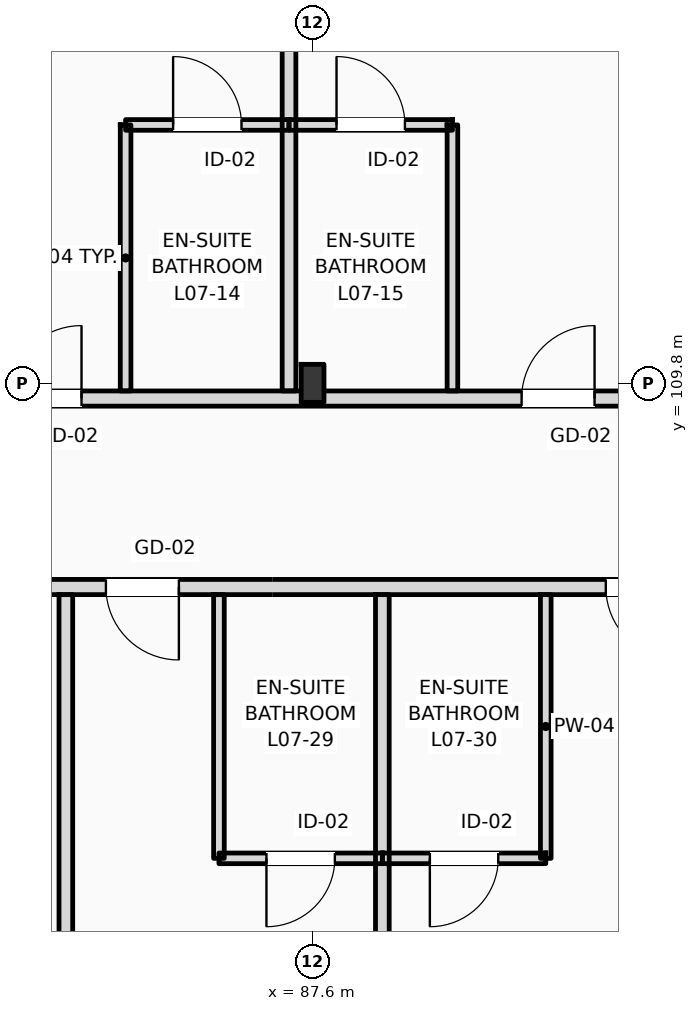
"""IFC4 building model, lengths in metres.
Left out: names, types, materials, properties, quantities, classifications, styles, units other than length and angle.
Written with IfcOpenShell. Run it as: python <this file> out.ifc"""

import sys

from ifc_helpers import new_model, si_unit, direction, frame, frame_2d, origin, origin_2d, place, context, subcontext, project, spatial, rectangle, i_section, extrude, element, fill, save


model = new_model("IFC4")
c1 = context("Model", 3, precision=1e-05, world=origin(), true_north=direction((0.0, 1.0)))
c2 = subcontext(c1, "Body", "Model", "MODEL_VIEW")
j1 = project(units=[si_unit("LENGTHUNIT", "METRE"), si_unit("PLANEANGLEUNIT", "RADIAN")], contexts=[c1])
p1 = place(None, origin())
s1 = spatial("IfcSite", under=j1, at=p1, CompositionType="ELEMENT")
p2 = place(p1, origin())
s2 = spatial("IfcBuilding", under=s1, at=p2, CompositionType="ELEMENT")
p3 = place(p2, frame((0.0, 0.0, 31.8)))
s3 = spatial("IfcBuildingStorey", under=s2, at=p3, CompositionType="ELEMENT", Elevation=31.8)
p4 = place(p3, frame((87.6, 109.8, 0.0), z_axis=(0.0, 0.0, 1.0), x_axis=(1.0, 0.0, 0.0)))
e1 = element("IfcColumn", 1, at=p4, inside=s3, PredefinedType="COLUMN", context=c2, shape_type="SweptSolid", body=[
    extrude(i_section(OverallWidth=0.3, OverallDepth=0.5, WebThickness=0.014, FlangeThickness=0.028, FilletRadius=0.027, at=origin_2d()), origin(), (0.0, 0.0, 1.0), 3.6),
])
p5 = place(p3, frame((10.65, 109.6, 0.0), z_axis=(0.0, 0.0, 1.0), x_axis=(1.0, 0.0, 0.0)))
e2 = element("IfcWall", 2, at=p5, inside=s3, PredefinedType="PARTITIONING", context=c2, shape_type="SweptSolid", body=[
    extrude(rectangle(XDim=109.21, YDim=0.2, at=frame_2d((54.605, 0.0))), origin(), (0.0, 0.0, 1.0), 2.72),
])
p6 = place(p5, frame((15.825, 0.0, 0.0)))
e3 = element("IfcOpeningElement", 3, at=p6, cuts=e2, PredefinedType="OPENING", context=c2, shape_type="SweptSolid", body=[
    extrude(rectangle(XDim=1.02, YDim=2.2, at=frame_2d((0.51, 1.1))), frame((0.0, 0.11, 0.0), z_axis=(0.0, -1.0, 0.0), x_axis=(1.0, 0.0, 0.0)), (0.0, 0.0, 1.0), 0.22),
])
p7 = place(p5, frame((19.87, 0.0, 0.0)))
e4 = element("IfcOpeningElement", 4, at=p7, cuts=e2, PredefinedType="OPENING", context=c2, shape_type="SweptSolid", body=[
    extrude(rectangle(XDim=1.02, YDim=2.2, at=frame_2d((0.51, 1.1))), frame((0.0, 0.11, 0.0), z_axis=(0.0, -1.0, 0.0), x_axis=(1.0, 0.0, 0.0)), (0.0, 0.0, 1.0), 0.22),
])
p8 = place(p5, frame((24.47, 0.0, 0.0)))
e5 = element("IfcOpeningElement", 5, at=p8, cuts=e2, PredefinedType="OPENING", context=c2, shape_type="SweptSolid", body=[
    extrude(rectangle(XDim=1.02, YDim=2.2, at=frame_2d((0.51, 1.1))), frame((0.0, 0.11, 0.0), z_axis=(0.0, -1.0, 0.0), x_axis=(1.0, 0.0, 0.0)), (0.0, 0.0, 1.0), 0.22),
])
p9 = place(p5, frame((26.92, 0.0, 0.0)))
e6 = element("IfcOpeningElement", 6, at=p9, cuts=e2, PredefinedType="OPENING", context=c2, shape_type="SweptSolid", body=[
    extrude(rectangle(XDim=1.02, YDim=2.2, at=frame_2d((0.51, 1.1))), frame((0.0, 0.11, 0.0), z_axis=(0.0, -1.0, 0.0), x_axis=(1.0, 0.0, 0.0)), (0.0, 0.0, 1.0), 0.22),
])
p10 = place(p5, frame((33.7, 0.0, 0.0)))
e7 = element("IfcOpeningElement", 7, at=p10, cuts=e2, PredefinedType="OPENING", context=c2, shape_type="SweptSolid", body=[
    extrude(rectangle(XDim=0.96, YDim=2.2, at=frame_2d((0.48, 1.1))), frame((0.0, 0.11, 0.0), z_axis=(0.0, -1.0, 0.0), x_axis=(1.0, 0.0, 0.0)), (0.0, 0.0, 1.0), 0.22),
])
p11 = place(p5, frame((35.9, 0.0, 0.0)))
e8 = element("IfcOpeningElement", 8, at=p11, cuts=e2, PredefinedType="OPENING", context=c2, shape_type="SweptSolid", body=[
    extrude(rectangle(XDim=0.96, YDim=2.2, at=frame_2d((0.48, 1.1))), frame((0.0, 0.11, 0.0), z_axis=(0.0, -1.0, 0.0), x_axis=(1.0, 0.0, 0.0)), (0.0, 0.0, 1.0), 0.22),
])
p12 = place(p5, frame((42.9, 0.0, 0.0)))
e9 = element("IfcOpeningElement", 9, at=p12, cuts=e2, PredefinedType="OPENING", context=c2, shape_type="SweptSolid", body=[
    extrude(rectangle(XDim=0.96, YDim=2.2, at=frame_2d((0.48, 1.1))), frame((0.0, 0.11, 0.0), z_axis=(0.0, -1.0, 0.0), x_axis=(1.0, 0.0, 0.0)), (0.0, 0.0, 1.0), 0.22),
])
p13 = place(p5, frame((47.5, 0.0, 0.0)))
e10 = element("IfcOpeningElement", 10, at=p13, cuts=e2, PredefinedType="OPENING", context=c2, shape_type="SweptSolid", body=[
    extrude(rectangle(XDim=0.96, YDim=2.2, at=frame_2d((0.48, 1.1))), frame((0.0, 0.11, 0.0), z_axis=(0.0, -1.0, 0.0), x_axis=(1.0, 0.0, 0.0)), (0.0, 0.0, 1.0), 0.22),
])
p14 = place(p5, frame((49.95, 0.0, 0.0)))
e11 = element("IfcOpeningElement", 11, at=p14, cuts=e2, PredefinedType="OPENING", context=c2, shape_type="SweptSolid", body=[
    extrude(rectangle(XDim=0.96, YDim=2.2, at=frame_2d((0.48, 1.1))), frame((0.0, 0.11, 0.0), z_axis=(0.0, -1.0, 0.0), x_axis=(1.0, 0.0, 0.0)), (0.0, 0.0, 1.0), 0.22),
])
p15 = place(p5, frame((56.7, 0.0, 0.0)))
e12 = element("IfcOpeningElement", 12, at=p15, cuts=e2, PredefinedType="OPENING", context=c2, shape_type="SweptSolid", body=[
    extrude(rectangle(XDim=0.96, YDim=2.2, at=frame_2d((0.48, 1.1))), frame((0.0, 0.11, 0.0), z_axis=(0.0, -1.0, 0.0), x_axis=(1.0, 0.0, 0.0)), (0.0, 0.0, 1.0), 0.22),
])
p16 = place(p5, frame((59.15, 0.0, 0.0)))
e13 = element("IfcOpeningElement", 13, at=p16, cuts=e2, PredefinedType="OPENING", context=c2, shape_type="SweptSolid", body=[
    extrude(rectangle(XDim=0.96, YDim=2.2, at=frame_2d((0.48, 1.1))), frame((0.0, 0.11, 0.0), z_axis=(0.0, -1.0, 0.0), x_axis=(1.0, 0.0, 0.0)), (0.0, 0.0, 1.0), 0.22),
])
p17 = place(p5, frame((65.9, 0.0, 0.0)))
e14 = element("IfcOpeningElement", 14, at=p17, cuts=e2, PredefinedType="OPENING", context=c2, shape_type="SweptSolid", body=[
    extrude(rectangle(XDim=0.96, YDim=2.2, at=frame_2d((0.48, 1.1))), frame((0.0, 0.11, 0.0), z_axis=(0.0, -1.0, 0.0), x_axis=(1.0, 0.0, 0.0)), (0.0, 0.0, 1.0), 0.22),
])
p18 = place(p5, frame((70.5, 0.0, 0.0)))
e15 = element("IfcOpeningElement", 15, at=p18, cuts=e2, PredefinedType="OPENING", context=c2, shape_type="SweptSolid", body=[
    extrude(rectangle(XDim=0.96, YDim=2.2, at=frame_2d((0.48, 1.1))), frame((0.0, 0.11, 0.0), z_axis=(0.0, -1.0, 0.0), x_axis=(1.0, 0.0, 0.0)), (0.0, 0.0, 1.0), 0.22),
])
p19 = place(p5, frame((72.95, 0.0, 0.0)))
e16 = element("IfcOpeningElement", 16, at=p19, cuts=e2, PredefinedType="OPENING", context=c2, shape_type="SweptSolid", body=[
    extrude(rectangle(XDim=0.96, YDim=2.2, at=frame_2d((0.48, 1.1))), frame((0.0, 0.11, 0.0), z_axis=(0.0, -1.0, 0.0), x_axis=(1.0, 0.0, 0.0)), (0.0, 0.0, 1.0), 0.22),
])
p20 = place(p5, frame((79.7, 0.0, 0.0)))
e17 = element("IfcOpeningElement", 17, at=p20, cuts=e2, PredefinedType="OPENING", context=c2, shape_type="SweptSolid", body=[
    extrude(rectangle(XDim=0.96, YDim=2.2, at=frame_2d((0.48, 1.1))), frame((0.0, 0.11, 0.0), z_axis=(0.0, -1.0, 0.0), x_axis=(1.0, 0.0, 0.0)), (0.0, 0.0, 1.0), 0.22),
])
p21 = place(p5, frame((82.15, 0.0, 0.0)))
e18 = element("IfcOpeningElement", 18, at=p21, cuts=e2, PredefinedType="OPENING", context=c2, shape_type="SweptSolid", body=[
    extrude(rectangle(XDim=0.96, YDim=2.2, at=frame_2d((0.48, 1.1))), frame((0.0, 0.11, 0.0), z_axis=(0.0, -1.0, 0.0), x_axis=(1.0, 0.0, 0.0)), (0.0, 0.0, 1.0), 0.22),
])
p22 = place(p5, frame((88.9, 0.0, 0.0)))
e19 = element("IfcOpeningElement", 19, at=p22, cuts=e2, PredefinedType="OPENING", context=c2, shape_type="SweptSolid", body=[
    extrude(rectangle(XDim=0.96, YDim=2.2, at=frame_2d((0.48, 1.1))), frame((0.0, 0.11, 0.0), z_axis=(0.0, -1.0, 0.0), x_axis=(1.0, 0.0, 0.0)), (0.0, 0.0, 1.0), 0.22),
])
p23 = place(p5, frame((93.75, 0.0, 0.0)))
e20 = element("IfcOpeningElement", 20, at=p23, cuts=e2, PredefinedType="OPENING", context=c2, shape_type="SweptSolid", body=[
    extrude(rectangle(XDim=0.96, YDim=2.2, at=frame_2d((0.48, 1.1))), frame((0.0, 0.11, 0.0), z_axis=(0.0, -1.0, 0.0), x_axis=(1.0, 0.0, 0.0)), (0.0, 0.0, 1.0), 0.22),
])
p24 = place(p5, frame((98.1, 0.0, 0.0)))
e21 = element("IfcOpeningElement", 21, at=p24, cuts=e2, PredefinedType="OPENING", context=c2, shape_type="SweptSolid", body=[
    extrude(rectangle(XDim=0.96, YDim=2.2, at=frame_2d((0.48, 1.1))), frame((0.0, 0.11, 0.0), z_axis=(0.0, -1.0, 0.0), x_axis=(1.0, 0.0, 0.0)), (0.0, 0.0, 1.0), 0.22),
])
p25 = place(p5, frame((102.7, 0.0, 0.0)))
e22 = element("IfcOpeningElement", 22, at=p25, cuts=e2, PredefinedType="OPENING", context=c2, shape_type="SweptSolid", body=[
    extrude(rectangle(XDim=0.96, YDim=2.2, at=frame_2d((0.48, 1.1))), frame((0.0, 0.11, 0.0), z_axis=(0.0, -1.0, 0.0), x_axis=(1.0, 0.0, 0.0)), (0.0, 0.0, 1.0), 0.22),
])
p26 = place(p5, frame((105.04, 0.0, 0.0)))
e23 = element("IfcOpeningElement", 23, at=p26, cuts=e2, PredefinedType="OPENING", context=c2, shape_type="SweptSolid", body=[
    extrude(rectangle(XDim=0.96, YDim=2.2, at=frame_2d((0.48, 1.1))), frame((0.0, 0.11, 0.0), z_axis=(0.0, -1.0, 0.0), x_axis=(1.0, 0.0, 0.0)), (0.0, 0.0, 1.0), 0.22),
])
p27 = place(p5, frame((2.716, 0.0, 0.0)))
e24 = element("IfcOpeningElement", 24, at=p27, cuts=e2, PredefinedType="OPENING", context=c2, shape_type="SweptSolid", body=[
    extrude(rectangle(XDim=1.35, YDim=2.25, at=frame_2d((0.675, 1.125))), frame((0.0, 0.11, 0.0), z_axis=(0.0, -1.0, 0.0), x_axis=(1.0, 0.0, 0.0)), (0.0, 0.0, 1.0), 0.22),
])
p28 = place(p5, frame((6.65, 0.0, 0.0)))
e25 = element("IfcOpeningElement", 25, at=p28, cuts=e2, PredefinedType="OPENING", context=c2, shape_type="SweptSolid", body=[
    extrude(rectangle(XDim=1.35, YDim=2.25, at=frame_2d((0.675, 1.125))), frame((0.0, 0.11, 0.0), z_axis=(0.0, -1.0, 0.0), x_axis=(1.0, 0.0, 0.0)), (0.0, 0.0, 1.0), 0.22),
])
p29 = place(p5, frame((10.583, 0.0, 0.0)))
e26 = element("IfcOpeningElement", 26, at=p29, cuts=e2, PredefinedType="OPENING", context=c2, shape_type="SweptSolid", body=[
    extrude(rectangle(XDim=1.35, YDim=2.25, at=frame_2d((0.675, 1.125))), frame((0.0, 0.11, 0.0), z_axis=(0.0, -1.0, 0.0), x_axis=(1.0, 0.0, 0.0)), (0.0, 0.0, 1.0), 0.22),
])
p30 = place(p3, frame((79.76, 107.12, 0.0), z_axis=(0.0, 0.0, 1.0), x_axis=(1.0, 0.0, 0.0)))
e27 = element("IfcWall", 27, at=p30, inside=s3, PredefinedType="PARTITIONING", context=c2, shape_type="SweptSolid", body=[
    extrude(rectangle(XDim=40.1, YDim=0.2, at=frame_2d((20.05, 0.0))), origin(), (0.0, 0.0, 1.0), 3.36),
])
p31 = place(p30, frame((2.887, 0.0, 0.0)))
e28 = element("IfcOpeningElement", 28, at=p31, cuts=e27, PredefinedType="OPENING", context=c2, shape_type="SweptSolid", body=[
    extrude(rectangle(XDim=0.96, YDim=2.2, at=frame_2d((0.48, 1.1))), frame((0.0, 0.11, 0.0), z_axis=(0.0, -1.0, 0.0), x_axis=(1.0, 0.0, 0.0)), (0.0, 0.0, 1.0), 0.22),
])
p32 = place(p30, frame((5.121, 0.0, 0.0)))
e29 = element("IfcOpeningElement", 29, at=p32, cuts=e27, PredefinedType="OPENING", context=c2, shape_type="SweptSolid", body=[
    extrude(rectangle(XDim=0.96, YDim=2.2, at=frame_2d((0.48, 1.1))), frame((0.0, 0.11, 0.0), z_axis=(0.0, -1.0, 0.0), x_axis=(1.0, 0.0, 0.0)), (0.0, 0.0, 1.0), 0.22),
])
p33 = place(p30, frame((11.698, 0.0, 0.0)))
e30 = element("IfcOpeningElement", 30, at=p33, cuts=e27, PredefinedType="OPENING", context=c2, shape_type="SweptSolid", body=[
    extrude(rectangle(XDim=0.96, YDim=2.2, at=frame_2d((0.48, 1.1))), frame((0.0, 0.11, 0.0), z_axis=(0.0, -1.0, 0.0), x_axis=(1.0, 0.0, 0.0)), (0.0, 0.0, 1.0), 0.22),
])
p34 = place(p30, frame((13.976, 0.0, 0.0)))
e31 = element("IfcOpeningElement", 31, at=p34, cuts=e27, PredefinedType="OPENING", context=c2, shape_type="SweptSolid", body=[
    extrude(rectangle(XDim=0.96, YDim=2.2, at=frame_2d((0.48, 1.1))), frame((0.0, 0.11, 0.0), z_axis=(0.0, -1.0, 0.0), x_axis=(1.0, 0.0, 0.0)), (0.0, 0.0, 1.0), 0.22),
])
p35 = place(p30, frame((20.554, 0.0, 0.0)))
e32 = element("IfcOpeningElement", 32, at=p35, cuts=e27, PredefinedType="OPENING", context=c2, shape_type="SweptSolid", body=[
    extrude(rectangle(XDim=0.96, YDim=2.2, at=frame_2d((0.48, 1.1))), frame((0.0, 0.11, 0.0), z_axis=(0.0, -1.0, 0.0), x_axis=(1.0, 0.0, 0.0)), (0.0, 0.0, 1.0), 0.22),
])
p36 = place(p30, frame((24.982, 0.0, 0.0)))
e33 = element("IfcOpeningElement", 33, at=p36, cuts=e27, PredefinedType="OPENING", context=c2, shape_type="SweptSolid", body=[
    extrude(rectangle(XDim=0.96, YDim=2.2, at=frame_2d((0.48, 1.1))), frame((0.0, 0.11, 0.0), z_axis=(0.0, -1.0, 0.0), x_axis=(1.0, 0.0, 0.0)), (0.0, 0.0, 1.0), 0.22),
])
p37 = place(p30, frame((29.409, 0.0, 0.0)))
e34 = element("IfcOpeningElement", 34, at=p37, cuts=e27, PredefinedType="OPENING", context=c2, shape_type="SweptSolid", body=[
    extrude(rectangle(XDim=0.96, YDim=2.2, at=frame_2d((0.48, 1.1))), frame((0.0, 0.11, 0.0), z_axis=(0.0, -1.0, 0.0), x_axis=(1.0, 0.0, 0.0)), (0.0, 0.0, 1.0), 0.22),
])
p38 = place(p30, frame((33.837, 0.0, 0.0)))
e35 = element("IfcOpeningElement", 35, at=p38, cuts=e27, PredefinedType="OPENING", context=c2, shape_type="SweptSolid", body=[
    extrude(rectangle(XDim=0.96, YDim=2.2, at=frame_2d((0.48, 1.1))), frame((0.0, 0.11, 0.0), z_axis=(0.0, -1.0, 0.0), x_axis=(1.0, 0.0, 0.0)), (0.0, 0.0, 1.0), 0.22),
])
p39 = place(p30, frame((36.027, 0.0, 0.0)))
e36 = element("IfcOpeningElement", 36, at=p39, cuts=e27, PredefinedType="OPENING", context=c2, shape_type="SweptSolid", body=[
    extrude(rectangle(XDim=0.96, YDim=2.2, at=frame_2d((0.48, 1.1))), frame((0.0, 0.11, 0.0), z_axis=(0.0, -1.0, 0.0), x_axis=(1.0, 0.0, 0.0)), (0.0, 0.0, 1.0), 0.22),
])
p40 = place(p3, frame((87.29, 109.7, 0.0), z_axis=(0.0, 0.0, 1.0), x_axis=(0.0, 1.0, 0.0)))
e37 = element("IfcWall", 37, at=p40, inside=s3, PredefinedType="PARTITIONING", context=c2, shape_type="SweptSolid", body=[
    extrude(rectangle(XDim=8.15, YDim=0.18, at=frame_2d((4.075, 0.0))), origin(), (0.0, 0.0, 1.0), 3.36),
])
p41 = place(p3, frame((85.14, 109.7, 0.0), z_axis=(0.0, 0.0, 1.0), x_axis=(0.0, 1.0, 0.0)))
e38 = element("IfcWall", 38, at=p41, inside=s3, PredefinedType="PARTITIONING", context=c2, shape_type="SweptSolid", body=[
    extrude(rectangle(XDim=3.5, YDim=0.14, at=frame_2d((1.75, 0.0))), origin(), (0.0, 0.0, 1.0), 3.05),
])
p42 = place(p3, frame((85.14, 113.2, 0.0), z_axis=(0.0, 0.0, 1.0), x_axis=(1.0, 0.0, 0.0)))
e39 = element("IfcWall", 39, at=p42, inside=s3, PredefinedType="PARTITIONING", context=c2, shape_type="SweptSolid", body=[
    extrude(rectangle(XDim=2.15, YDim=0.14, at=frame_2d((1.075, 0.0))), origin(), (0.0, 0.0, 1.0), 3.36),
])
p43 = place(p42, frame((0.625, 0.0, 0.0)))
e40 = element("IfcOpeningElement", 40, at=p43, cuts=e39, PredefinedType="OPENING", context=c2, shape_type="SweptSolid", body=[
    extrude(rectangle(XDim=0.9, YDim=2.1, at=frame_2d((0.45, 1.05))), frame((0.0, 0.08, 0.0), z_axis=(0.0, -1.0, 0.0), x_axis=(1.0, 0.0, 0.0)), (0.0, 0.0, 1.0), 0.16),
])
p44 = place(p3, frame((89.44, 109.7, 0.0), z_axis=(0.0, 0.0, 1.0), x_axis=(0.0, 1.0, 0.0)))
e41 = element("IfcWall", 41, at=p44, inside=s3, PredefinedType="PARTITIONING", context=c2, shape_type="SweptSolid", body=[
    extrude(rectangle(XDim=3.5, YDim=0.14, at=frame_2d((1.75, 0.0))), origin(), (0.0, 0.0, 1.0), 3.36),
])
p45 = place(p3, frame((87.29, 113.2, 0.0), z_axis=(0.0, 0.0, 1.0), x_axis=(1.0, 0.0, 0.0)))
e42 = element("IfcWall", 42, at=p45, inside=s3, PredefinedType="PARTITIONING", context=c2, shape_type="SweptSolid", body=[
    extrude(rectangle(XDim=2.15, YDim=0.14, at=frame_2d((1.075, 0.0))), origin(), (0.0, 0.0, 1.0), 3.36),
])
p46 = place(p45, frame((0.625, 0.0, 0.0)))
e43 = element("IfcOpeningElement", 43, at=p46, cuts=e42, PredefinedType="OPENING", context=c2, shape_type="SweptSolid", body=[
    extrude(rectangle(XDim=0.9, YDim=2.1, at=frame_2d((0.45, 1.05))), frame((0.0, 0.08, 0.0), z_axis=(0.0, -1.0, 0.0), x_axis=(1.0, 0.0, 0.0)), (0.0, 0.0, 1.0), 0.16),
])
for number, where, z_axis, x_axis in (
    (44, (84.354, 96.14, 0.0), (0.0, 0.0, 1.0), (0.0, 1.0, 0.0)),
    (45, (88.518, 96.14, 0.0), (0.0, 0.0, 1.0), (0.0, 1.0, 0.0)),
):
    element("IfcWall", number, at=place(p3, frame(where, z_axis=z_axis, x_axis=x_axis)), inside=s3, PredefinedType="PARTITIONING", context=c2, shape_type="SweptSolid", body=[
        extrude(rectangle(XDim=10.88, YDim=0.18, at=frame_2d((5.44, 0.0))), origin(), (0.0, 0.0, 1.0), 3.36),
    ])
p47 = place(p3, frame((86.368, 103.55, 0.0), z_axis=(0.0, 0.0, 1.0), x_axis=(0.0, 1.0, 0.0)))
e46 = element("IfcWall", 46, at=p47, inside=s3, PredefinedType="PARTITIONING", context=c2, shape_type="SweptSolid", body=[
    extrude(rectangle(XDim=3.47, YDim=0.14, at=frame_2d((1.735, 0.0))), origin(), (0.0, 0.0, 1.0), 3.36),
])
p48 = place(p3, frame((86.368, 103.55, 0.0), z_axis=(0.0, 0.0, 1.0), x_axis=(1.0, 0.0, 0.0)))
e47 = element("IfcWall", 47, at=p48, inside=s3, PredefinedType="PARTITIONING", context=c2, shape_type="SweptSolid", body=[
    extrude(rectangle(XDim=2.15, YDim=0.14, at=frame_2d((1.075, 0.0))), origin(), (0.0, 0.0, 1.0), 3.36),
])
p49 = place(p48, frame((0.625, 0.0, 0.0)))
e48 = element("IfcOpeningElement", 48, at=p49, cuts=e47, PredefinedType="OPENING", context=c2, shape_type="SweptSolid", body=[
    extrude(rectangle(XDim=0.9, YDim=2.1, at=frame_2d((0.45, 1.05))), frame((0.0, 0.08, 0.0), z_axis=(0.0, -1.0, 0.0), x_axis=(1.0, 0.0, 0.0)), (0.0, 0.0, 1.0), 0.16),
])
p50 = place(p3, frame((90.668, 103.55, 0.0), z_axis=(0.0, 0.0, 1.0), x_axis=(0.0, 1.0, 0.0)))
e49 = element("IfcWall", 49, at=p50, inside=s3, PredefinedType="PARTITIONING", context=c2, shape_type="SweptSolid", body=[
    extrude(rectangle(XDim=3.47, YDim=0.14, at=frame_2d((1.735, 0.0))), origin(), (0.0, 0.0, 1.0), 3.36),
])
p51 = place(p3, frame((88.518, 103.55, 0.0), z_axis=(0.0, 0.0, 1.0), x_axis=(1.0, 0.0, 0.0)))
e50 = element("IfcWall", 50, at=p51, inside=s3, PredefinedType="PARTITIONING", context=c2, shape_type="SweptSolid", body=[
    extrude(rectangle(XDim=2.15, YDim=0.14, at=frame_2d((1.075, 0.0))), origin(), (0.0, 0.0, 1.0), 3.36),
])
p52 = place(p51, frame((0.625, 0.0, 0.0)))
e51 = element("IfcOpeningElement", 51, at=p52, cuts=e50, PredefinedType="OPENING", context=c2, shape_type="SweptSolid", body=[
    extrude(rectangle(XDim=0.9, YDim=2.1, at=frame_2d((0.45, 1.05))), frame((0.0, 0.08, 0.0), z_axis=(0.0, -1.0, 0.0), x_axis=(1.0, 0.0, 0.0)), (0.0, 0.0, 1.0), 0.16),
])
p53 = place(p19, origin())
e52 = element("IfcDoor", 52, at=p53, inside=s3, OperationType="SINGLE_SWING_RIGHT", PredefinedType="DOOR", context=c2, shape_type="SweptSolid", body=[
    extrude(rectangle(XDim=0.96, YDim=2.2, at=frame_2d((0.48, 1.1))), frame((0.0, 0.025, 0.0), z_axis=(0.0, -1.0, 0.0), x_axis=(1.0, 0.0, 0.0)), (0.0, 0.0, 1.0), 0.05),
])
fill(e16, e52)
p54 = place(p43, origin())
e53 = element("IfcDoor", 53, at=p54, inside=s3, OperationType="SINGLE_SWING_LEFT", PredefinedType="DOOR", context=c2, shape_type="SweptSolid", body=[
    extrude(rectangle(XDim=0.9, YDim=2.1, at=frame_2d((0.45, 1.05))), frame((0.0, 0.025, 0.0), z_axis=(0.0, -1.0, 0.0), x_axis=(1.0, 0.0, 0.0)), (0.0, 0.0, 1.0), 0.05),
])
fill(e40, e53)
p55 = place(p20, origin())
e54 = element("IfcDoor", 54, at=p55, inside=s3, OperationType="SINGLE_SWING_RIGHT", PredefinedType="DOOR", context=c2, shape_type="SweptSolid", body=[
    extrude(rectangle(XDim=0.96, YDim=2.2, at=frame_2d((0.48, 1.1))), frame((0.0, 0.025, 0.0), z_axis=(0.0, -1.0, 0.0), x_axis=(1.0, 0.0, 0.0)), (0.0, 0.0, 1.0), 0.05),
])
fill(e17, e54)
p56 = place(p46, origin())
e55 = element("IfcDoor", 55, at=p56, inside=s3, OperationType="SINGLE_SWING_LEFT", PredefinedType="DOOR", context=c2, shape_type="SweptSolid", body=[
    extrude(rectangle(XDim=0.9, YDim=2.1, at=frame_2d((0.45, 1.05))), frame((0.0, 0.025, 0.0), z_axis=(0.0, -1.0, 0.0), x_axis=(1.0, 0.0, 0.0)), (0.0, 0.0, 1.0), 0.05),
])
fill(e43, e55)
p57 = place(p32, frame((0.96, 0.0, 0.0), z_axis=(0.0, 0.0, 1.0), x_axis=(-1.0, 0.0, 0.0)))
e56 = element("IfcDoor", 56, at=p57, inside=s3, OperationType="SINGLE_SWING_RIGHT", PredefinedType="DOOR", context=c2, shape_type="SweptSolid", body=[
    extrude(rectangle(XDim=0.96, YDim=2.2, at=frame_2d((0.48, 1.1))), frame((0.0, 0.025, 0.0), z_axis=(0.0, -1.0, 0.0), x_axis=(1.0, 0.0, 0.0)), (0.0, 0.0, 1.0), 0.05),
])
fill(e29, e56)
p58 = place(p49, frame((0.9, 0.0, 0.0), z_axis=(0.0, 0.0, 1.0), x_axis=(-1.0, 0.0, 0.0)))
e57 = element("IfcDoor", 57, at=p58, inside=s3, OperationType="SINGLE_SWING_LEFT", PredefinedType="DOOR", context=c2, shape_type="SweptSolid", body=[
    extrude(rectangle(XDim=0.9, YDim=2.1, at=frame_2d((0.45, 1.05))), frame((0.0, 0.025, 0.0), z_axis=(0.0, -1.0, 0.0), x_axis=(1.0, 0.0, 0.0)), (0.0, 0.0, 1.0), 0.05),
])
fill(e48, e57)
p59 = place(p33, frame((0.96, 0.0, 0.0), z_axis=(0.0, 0.0, 1.0), x_axis=(-1.0, 0.0, 0.0)))
e58 = element("IfcDoor", 58, at=p59, inside=s3, OperationType="SINGLE_SWING_RIGHT", PredefinedType="DOOR", context=c2, shape_type="SweptSolid", body=[
    extrude(rectangle(XDim=0.96, YDim=2.2, at=frame_2d((0.48, 1.1))), frame((0.0, 0.025, 0.0), z_axis=(0.0, -1.0, 0.0), x_axis=(1.0, 0.0, 0.0)), (0.0, 0.0, 1.0), 0.05),
])
fill(e30, e58)
p60 = place(p52, frame((0.9, 0.0, 0.0), z_axis=(0.0, 0.0, 1.0), x_axis=(-1.0, 0.0, 0.0)))
e59 = element("IfcDoor", 59, at=p60, inside=s3, OperationType="SINGLE_SWING_LEFT", PredefinedType="DOOR", context=c2, shape_type="SweptSolid", body=[
    extrude(rectangle(XDim=0.9, YDim=2.1, at=frame_2d((0.45, 1.05))), frame((0.0, 0.025, 0.0), z_axis=(0.0, -1.0, 0.0), x_axis=(1.0, 0.0, 0.0)), (0.0, 0.0, 1.0), 0.05),
])
fill(e51, e59)
save(model, sys.argv[1])
